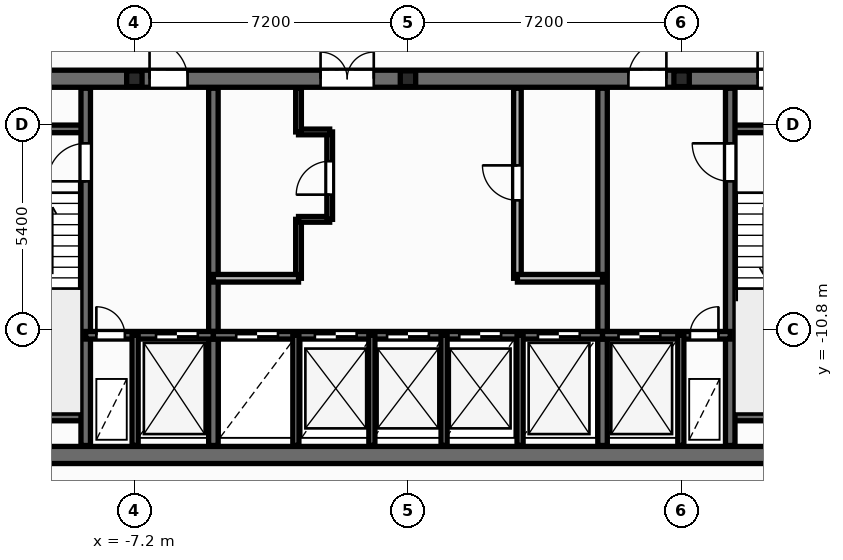
"""IFC4 building model, lengths in metres.
Left out: names, types, materials, properties, quantities, classifications, styles, units other than length and angle.
Written with IfcOpenShell. Run it as: python <this file> out.ifc"""

import sys

from ifc_helpers import new_model, si_unit, direction, frame, frame_2d, origin, origin_2d, place, context, subcontext, project, spatial, rectangle, i_section, extrude, element, fill, save


model = new_model("IFC4")
c1 = context("Model", 3, precision=1e-05, world=origin(), true_north=direction((0.0, 1.0)))
c2 = subcontext(c1, "Body", "Model", "MODEL_VIEW")
j1 = project(units=[si_unit("LENGTHUNIT", "METRE"), si_unit("PLANEANGLEUNIT", "RADIAN")], contexts=[c1])
p1 = place(None, origin())
s1 = spatial("IfcSite", under=j1, at=p1, CompositionType="ELEMENT")
p2 = place(p1, origin())
s2 = spatial("IfcBuilding", under=s1, at=p2, CompositionType="ELEMENT")
p3 = place(p2, frame((0.0, 0.0, 200.1)))
s3 = spatial("IfcBuildingStorey", under=s2, at=p3, CompositionType="ELEMENT", Elevation=200.1)
for number, where, z_axis, x_axis in (
    (1, (-7.2, -4.2, 0.0), (0.0, 0.0, 1.0), (1.0, 0.0, 0.0)),
    (2, (0.0, -4.2, 0.0), (0.0, 0.0, 1.0), (1.0, 0.0, 0.0)),
    (3, (7.2, -4.2, 0.0), (0.0, 0.0, 1.0), (1.0, 0.0, 0.0)),
):
    element("IfcColumn", number, at=place(p3, frame(where, z_axis=z_axis, x_axis=x_axis)), inside=s3, PredefinedType="PILASTER", context=c2, shape_type="SweptSolid", body=[
        extrude(i_section(OverallWidth=0.405, OverallDepth=0.414, WebThickness=0.022, FlangeThickness=0.032, at=origin_2d()), origin(), (0.0, 0.0, 1.0), 3.6),
    ])
p4 = place(p3, frame((-2.88, -9.45, 0.0), z_axis=(0.0, 0.0, 1.0), x_axis=(0.0, 1.0, 0.0)))
e4 = element("IfcWall", 4, at=p4, inside=s3, PredefinedType="PARTITIONING", context=c2, shape_type="SweptSolid", body=[
    extrude(rectangle(XDim=1.55, YDim=0.15, at=frame_2d((0.775, 0.0))), origin(), (0.0, 0.0, 1.0), 3.345),
])
p5 = place(p3, frame((-2.88, -7.9, 0.0), z_axis=(0.0, 0.0, 1.0), x_axis=(1.0, 0.0, 0.0)))
e5 = element("IfcWall", 5, at=p5, inside=s3, PredefinedType="PARTITIONING", context=c2, shape_type="SweptSolid", body=[
    extrude(rectangle(XDim=0.82, YDim=0.15, at=frame_2d((0.41, 0.0))), origin(), (0.0, 0.0, 1.0), 3.345),
])
p6 = place(p3, frame((-2.06, -7.9, 0.0), z_axis=(0.0, 0.0, 1.0), x_axis=(0.0, 1.0, 0.0)))
e6 = element("IfcWall", 6, at=p6, inside=s3, PredefinedType="PARTITIONING", context=c2, shape_type="SweptSolid", body=[
    extrude(rectangle(XDim=2.3, YDim=0.15, at=frame_2d((1.15, 0.0))), origin(), (0.0, 0.0, 1.0), 3.345),
])
p7 = place(p6, frame((0.65, 0.0, 0.0)))
e7 = element("IfcOpeningElement", 7, at=p7, cuts=e6, PredefinedType="OPENING", context=c2, shape_type="SweptSolid", body=[
    extrude(rectangle(XDim=0.886, YDim=2.104, at=frame_2d((0.44, 1.052))), frame((0.0, 0.085, 0.0), z_axis=(0.0, -1.0, 0.0), x_axis=(1.0, 0.0, 0.0)), (0.0, 0.0, 1.0), 0.17),
])
p8 = place(p3, frame((-2.88, -5.6, 0.0), z_axis=(0.0, 0.0, 1.0), x_axis=(1.0, 0.0, 0.0)))
e8 = element("IfcWall", 8, at=p8, inside=s3, PredefinedType="PARTITIONING", context=c2, shape_type="SweptSolid", body=[
    extrude(rectangle(XDim=0.82, YDim=0.15, at=frame_2d((0.41, 0.0))), origin(), (0.0, 0.0, 1.0), 3.345),
])
p9 = place(p3, frame((-2.88, -5.6, 0.0), z_axis=(0.0, 0.0, 1.0), x_axis=(0.0, 1.0, 0.0)))
e9 = element("IfcWall", 9, at=p9, inside=s3, PredefinedType="PARTITIONING", context=c2, shape_type="SweptSolid", body=[
    extrude(rectangle(XDim=1.15, YDim=0.15, at=frame_2d((0.575, 0.0))), origin(), (0.0, 0.0, 1.0), 3.345),
])
p10 = place(p3, frame((-12.65, -14.1, 0.0), z_axis=(0.0, 0.0, 1.0), x_axis=(1.0, 0.0, 0.0)))
e10 = element("IfcWall", 10, at=p10, inside=s3, PredefinedType="SHEAR", context=c2, shape_type="SweptSolid", body=[
    extrude(rectangle(XDim=25.3, YDim=0.45, at=frame_2d((12.65, 0.0))), origin(), (0.0, 0.0, 1.0), 3.6),
])
p11 = place(p3, frame((-12.65, -4.2, 0.0), z_axis=(0.0, 0.0, 1.0), x_axis=(1.0, 0.0, 0.0)))
e11 = element("IfcWall", 11, at=p11, inside=s3, PredefinedType="SHEAR", context=c2, shape_type="SweptSolid", body=[
    extrude(rectangle(XDim=25.3, YDim=0.45, at=frame_2d((12.65, 0.0))), origin(), (0.0, 0.0, 1.0), 3.6),
])
p12 = place(p11, frame((1.85, 0.0, 0.0)))
e12 = element("IfcOpeningElement", 12, at=p12, cuts=e11, PredefinedType="OPENING", context=c2, shape_type="SweptSolid", body=[
    extrude(rectangle(XDim=0.756, YDim=2.054, at=frame_2d((0.375, 1.027))), frame((0.0, 0.235, 0.0), z_axis=(0.0, -1.0, 0.0), x_axis=(1.0, 0.0, 0.0)), (0.0, 0.0, 1.0), 0.47),
])
p13 = place(p11, frame((21.85, 0.0, 0.0)))
e13 = element("IfcOpeningElement", 13, at=p13, cuts=e11, PredefinedType="OPENING", context=c2, shape_type="SweptSolid", body=[
    extrude(rectangle(XDim=0.756, YDim=2.054, at=frame_2d((0.375, 1.027))), frame((0.0, 0.235, 0.0), z_axis=(0.0, -1.0, 0.0), x_axis=(1.0, 0.0, 0.0)), (0.0, 0.0, 1.0), 0.47),
])
p14 = place(p11, frame((23.5, 0.0, 0.0)))
e14 = element("IfcOpeningElement", 14, at=p14, cuts=e11, PredefinedType="OPENING", context=c2, shape_type="SweptSolid", body=[
    extrude(rectangle(XDim=0.756, YDim=2.054, at=frame_2d((0.375, 1.027))), frame((0.0, 0.235, 0.0), z_axis=(0.0, -1.0, 0.0), x_axis=(1.0, 0.0, 0.0)), (0.0, 0.0, 1.0), 0.47),
])
p15 = place(p11, frame((5.85, 0.0, 0.0)))
e15 = element("IfcOpeningElement", 15, at=p15, cuts=e11, PredefinedType="OPENING", context=c2, shape_type="SweptSolid", body=[
    extrude(rectangle(XDim=1.006, YDim=2.104, at=frame_2d((0.5, 1.052))), frame((0.0, 0.235, 0.0), z_axis=(0.0, -1.0, 0.0), x_axis=(1.0, 0.0, 0.0)), (0.0, 0.0, 1.0), 0.47),
])
p16 = place(p11, frame((10.35, 0.0, 0.0)))
e16 = element("IfcOpeningElement", 16, at=p16, cuts=e11, PredefinedType="OPENING", context=c2, shape_type="SweptSolid", body=[
    extrude(rectangle(XDim=1.406, YDim=2.154, at=frame_2d((0.7, 1.077))), frame((0.0, 0.235, 0.0), z_axis=(0.0, -1.0, 0.0), x_axis=(1.0, 0.0, 0.0)), (0.0, 0.0, 1.0), 0.47),
])
p17 = place(p11, frame((18.45, 0.0, 0.0)))
e17 = element("IfcOpeningElement", 17, at=p17, cuts=e11, PredefinedType="OPENING", context=c2, shape_type="SweptSolid", body=[
    extrude(rectangle(XDim=1.006, YDim=2.104, at=frame_2d((0.5, 1.052))), frame((0.0, 0.235, 0.0), z_axis=(0.0, -1.0, 0.0), x_axis=(1.0, 0.0, 0.0)), (0.0, 0.0, 1.0), 0.47),
])
for number, where, z_axis, x_axis in (
    (18, (-12.35, -5.52, 0.0), (0.0, 0.0, 1.0), (1.0, 0.0, 0.0)),
    (19, (-12.35, -13.1, 0.0), (0.0, 0.0, 1.0), (1.0, 0.0, 0.0)),
    (20, (8.48, -5.52, 0.0), (0.0, 0.0, 1.0), (1.0, 0.0, 0.0)),
    (21, (8.48, -13.1, 0.0), (0.0, 0.0, 1.0), (1.0, 0.0, 0.0)),
):
    element("IfcWall", number, at=place(p3, frame(where, z_axis=z_axis, x_axis=x_axis)), inside=s3, PredefinedType="SOLIDWALL", context=c2, shape_type="SweptSolid", body=[
        extrude(rectangle(XDim=3.87, YDim=0.2, at=frame_2d((1.935, 0.0))), origin(), (0.0, 0.0, 1.0), 3.6),
    ])
p18 = place(p3, frame((-8.48, -13.85, 0.0), z_axis=(0.0, 0.0, 1.0), x_axis=(0.0, 1.0, 0.0)))
e22 = element("IfcWall", 22, at=p18, inside=s3, PredefinedType="SHEAR", context=c2, shape_type="SweptSolid", body=[
    extrude(rectangle(XDim=9.4, YDim=0.25, at=frame_2d((4.7, 0.0))), origin(), (0.0, 0.0, 1.0), 3.6),
])
p19 = place(p18, frame((6.95, 0.0, 0.0)))
e23 = element("IfcOpeningElement", 23, at=p19, cuts=e22, PredefinedType="OPENING", context=c2, shape_type="SweptSolid", body=[
    extrude(rectangle(XDim=1.006, YDim=2.104, at=frame_2d((0.5, 1.052))), frame((0.0, 0.135, 0.0), z_axis=(0.0, -1.0, 0.0), x_axis=(1.0, 0.0, 0.0)), (0.0, 0.0, 1.0), 0.27),
])
p20 = place(p3, frame((8.48, -13.85, 0.0), z_axis=(0.0, 0.0, 1.0), x_axis=(0.0, 1.0, 0.0)))
e24 = element("IfcWall", 24, at=p20, inside=s3, PredefinedType="SHEAR", context=c2, shape_type="SweptSolid", body=[
    extrude(rectangle(XDim=9.4, YDim=0.25, at=frame_2d((4.7, 0.0))), origin(), (0.0, 0.0, 1.0), 3.6),
])
p21 = place(p20, frame((6.95, 0.0, 0.0)))
e25 = element("IfcOpeningElement", 25, at=p21, cuts=e24, PredefinedType="OPENING", context=c2, shape_type="SweptSolid", body=[
    extrude(rectangle(XDim=1.006, YDim=2.104, at=frame_2d((0.5, 1.052))), frame((0.0, 0.135, 0.0), z_axis=(0.0, -1.0, 0.0), x_axis=(1.0, 0.0, 0.0)), (0.0, 0.0, 1.0), 0.27),
])
for number, where, z_axis, x_axis in (
    (26, (-5.12, -13.85, 0.0), (0.0, 0.0, 1.0), (0.0, 1.0, 0.0)),
    (27, (5.12, -13.85, 0.0), (0.0, 0.0, 1.0), (0.0, 1.0, 0.0)),
):
    element("IfcWall", number, at=place(p3, frame(where, z_axis=z_axis, x_axis=x_axis)), inside=s3, PredefinedType="SHEAR", context=c2, shape_type="SweptSolid", body=[
        extrude(rectangle(XDim=9.4, YDim=0.25, at=frame_2d((4.7, 0.0))), origin(), (0.0, 0.0, 1.0), 3.6),
    ])
p22 = place(p3, frame((-8.48, -10.95, 0.0), z_axis=(0.0, 0.0, 1.0), x_axis=(1.0, 0.0, 0.0)))
e28 = element("IfcWall", 28, at=p22, inside=s3, PredefinedType="SOLIDWALL", context=c2, shape_type="SweptSolid", body=[
    extrude(rectangle(XDim=3.36, YDim=0.2, at=frame_2d((1.68, 0.0))), origin(), (0.0, 0.0, 1.0), 3.6),
])
p23 = place(p22, frame((0.28, 0.0, 0.0)))
e29 = element("IfcOpeningElement", 29, at=p23, cuts=e28, PredefinedType="OPENING", context=c2, shape_type="SweptSolid", body=[
    extrude(rectangle(XDim=0.756, YDim=2.054, at=frame_2d((0.375, 1.027))), frame((0.0, 0.11, 0.0), z_axis=(0.0, -1.0, 0.0), x_axis=(1.0, 0.0, 0.0)), (0.0, 0.0, 1.0), 0.22),
])
p24 = place(p22, frame((1.85, 0.0, 0.0)))
e30 = element("IfcOpeningElement", 30, at=p24, cuts=e28, PredefinedType="OPENING", context=c2, shape_type="SweptSolid", body=[
    extrude(rectangle(XDim=1.106, YDim=2.104, at=frame_2d((0.55, 1.052))), frame((0.0, 0.11, 0.0), z_axis=(0.0, -1.0, 0.0), x_axis=(1.0, 0.0, 0.0)), (0.0, 0.0, 1.0), 0.22),
])
p25 = place(p3, frame((-5.12, -10.95, 0.0), z_axis=(0.0, 0.0, 1.0), x_axis=(1.0, 0.0, 0.0)))
e31 = element("IfcWall", 31, at=p25, inside=s3, PredefinedType="SOLIDWALL", context=c2, shape_type="SweptSolid", body=[
    extrude(rectangle(XDim=10.24, YDim=0.2, at=frame_2d((5.12, 0.0))), origin(), (0.0, 0.0, 1.0), 3.6),
])
p26 = place(p25, frame((0.6, 0.0, 0.0)))
e32 = element("IfcOpeningElement", 32, at=p26, cuts=e31, PredefinedType="OPENING", context=c2, shape_type="SweptSolid", body=[
    extrude(rectangle(XDim=1.106, YDim=2.104, at=frame_2d((0.55, 1.052))), frame((0.0, 0.11, 0.0), z_axis=(0.0, -1.0, 0.0), x_axis=(1.0, 0.0, 0.0)), (0.0, 0.0, 1.0), 0.22),
])
p27 = place(p25, frame((2.67, 0.0, 0.0)))
e33 = element("IfcOpeningElement", 33, at=p27, cuts=e31, PredefinedType="OPENING", context=c2, shape_type="SweptSolid", body=[
    extrude(rectangle(XDim=1.106, YDim=2.104, at=frame_2d((0.55, 1.052))), frame((0.0, 0.11, 0.0), z_axis=(0.0, -1.0, 0.0), x_axis=(1.0, 0.0, 0.0)), (0.0, 0.0, 1.0), 0.22),
])
p28 = place(p25, frame((4.57, 0.0, 0.0)))
e34 = element("IfcOpeningElement", 34, at=p28, cuts=e31, PredefinedType="OPENING", context=c2, shape_type="SweptSolid", body=[
    extrude(rectangle(XDim=1.106, YDim=2.104, at=frame_2d((0.55, 1.052))), frame((0.0, 0.11, 0.0), z_axis=(0.0, -1.0, 0.0), x_axis=(1.0, 0.0, 0.0)), (0.0, 0.0, 1.0), 0.22),
])
p29 = place(p25, frame((6.47, 0.0, 0.0)))
e35 = element("IfcOpeningElement", 35, at=p29, cuts=e31, PredefinedType="OPENING", context=c2, shape_type="SweptSolid", body=[
    extrude(rectangle(XDim=1.106, YDim=2.104, at=frame_2d((0.55, 1.052))), frame((0.0, 0.11, 0.0), z_axis=(0.0, -1.0, 0.0), x_axis=(1.0, 0.0, 0.0)), (0.0, 0.0, 1.0), 0.22),
])
p30 = place(p25, frame((8.54, 0.0, 0.0)))
e36 = element("IfcOpeningElement", 36, at=p30, cuts=e31, PredefinedType="OPENING", context=c2, shape_type="SweptSolid", body=[
    extrude(rectangle(XDim=1.106, YDim=2.104, at=frame_2d((0.55, 1.052))), frame((0.0, 0.11, 0.0), z_axis=(0.0, -1.0, 0.0), x_axis=(1.0, 0.0, 0.0)), (0.0, 0.0, 1.0), 0.22),
])
p31 = place(p3, frame((5.12, -10.95, 0.0), z_axis=(0.0, 0.0, 1.0), x_axis=(1.0, 0.0, 0.0)))
e37 = element("IfcWall", 37, at=p31, inside=s3, PredefinedType="SOLIDWALL", context=c2, shape_type="SweptSolid", body=[
    extrude(rectangle(XDim=3.36, YDim=0.2, at=frame_2d((1.68, 0.0))), origin(), (0.0, 0.0, 1.0), 3.6),
])
p32 = place(p31, frame((0.42, 0.0, 0.0)))
e38 = element("IfcOpeningElement", 38, at=p32, cuts=e37, PredefinedType="OPENING", context=c2, shape_type="SweptSolid", body=[
    extrude(rectangle(XDim=1.106, YDim=2.104, at=frame_2d((0.55, 1.052))), frame((0.0, 0.11, 0.0), z_axis=(0.0, -1.0, 0.0), x_axis=(1.0, 0.0, 0.0)), (0.0, 0.0, 1.0), 0.22),
])
p33 = place(p31, frame((2.3, 0.0, 0.0)))
e39 = element("IfcOpeningElement", 39, at=p33, cuts=e37, PredefinedType="OPENING", context=c2, shape_type="SweptSolid", body=[
    extrude(rectangle(XDim=0.756, YDim=2.054, at=frame_2d((0.375, 1.027))), frame((0.0, 0.11, 0.0), z_axis=(0.0, -1.0, 0.0), x_axis=(1.0, 0.0, 0.0)), (0.0, 0.0, 1.0), 0.22),
])
for number, where, z_axis, x_axis in (
    (40, (-7.18, -13.85, 0.0), (0.0, 0.0, 1.0), (0.0, 1.0, 0.0)),
    (41, (7.18, -13.85, 0.0), (0.0, 0.0, 1.0), (0.0, 1.0, 0.0)),
    (42, (-2.95, -13.85, 0.0), (0.0, 0.0, 1.0), (0.0, 1.0, 0.0)),
    (43, (2.95, -13.85, 0.0), (0.0, 0.0, 1.0), (0.0, 1.0, 0.0)),
):
    element("IfcWall", number, at=place(p3, frame(where, z_axis=z_axis, x_axis=x_axis)), inside=s3, PredefinedType="PARTITIONING", context=c2, shape_type="SweptSolid", body=[
        extrude(rectangle(XDim=2.9, YDim=0.16, at=frame_2d((1.45, 0.0))), origin(), (0.0, 0.0, 1.0), 2.47),
    ])
p34 = place(p3, frame((-5.12, -9.45, 0.0), z_axis=(0.0, 0.0, 1.0), x_axis=(1.0, 0.0, 0.0)))
e44 = element("IfcWall", 44, at=p34, inside=s3, PredefinedType="SOLIDWALL", context=c2, shape_type="SweptSolid", body=[
    extrude(rectangle(XDim=2.24, YDim=0.2, at=frame_2d((1.12, 0.0))), origin(), (0.0, 0.0, 1.0), 3.345),
])
p35 = place(p3, frame((2.88, -9.45, 0.0), z_axis=(0.0, 0.0, 1.0), x_axis=(0.0, 1.0, 0.0)))
e45 = element("IfcWall", 45, at=p35, inside=s3, PredefinedType="SOLIDWALL", context=c2, shape_type="SweptSolid", body=[
    extrude(rectangle(XDim=5.0, YDim=0.2, at=frame_2d((2.5, 0.0))), origin(), (0.0, 0.0, 1.0), 3.345),
])
p36 = place(p35, frame((2.05, 0.0, 0.0)))
e46 = element("IfcOpeningElement", 46, at=p36, cuts=e45, PredefinedType="OPENING", context=c2, shape_type="SweptSolid", body=[
    extrude(rectangle(XDim=0.926, YDim=2.104, at=frame_2d((0.46, 1.052))), frame((0.0, 0.11, 0.0), z_axis=(0.0, -1.0, 0.0), x_axis=(1.0, 0.0, 0.0)), (0.0, 0.0, 1.0), 0.22),
])
p37 = place(p3, frame((2.88, -9.45, 0.0), z_axis=(0.0, 0.0, 1.0), x_axis=(1.0, 0.0, 0.0)))
e47 = element("IfcWall", 47, at=p37, inside=s3, PredefinedType="SOLIDWALL", context=c2, shape_type="SweptSolid", body=[
    extrude(rectangle(XDim=2.24, YDim=0.2, at=frame_2d((1.12, 0.0))), origin(), (0.0, 0.0, 1.0), 3.345),
])
for number, where, z_axis, x_axis in (
    (48, (-0.95, -13.85, 0.0), (0.0, 0.0, 1.0), (0.0, 1.0, 0.0)),
    (49, (0.95, -13.85, 0.0), (0.0, 0.0, 1.0), (0.0, 1.0, 0.0)),
):
    element("IfcWall", number, at=place(p3, frame(where, z_axis=z_axis, x_axis=x_axis)), inside=s3, PredefinedType="PARTITIONING", context=c2, shape_type="SweptSolid", body=[
        extrude(rectangle(XDim=2.9, YDim=0.16, at=frame_2d((1.45, 0.0))), origin(), (0.0, 0.0, 1.0), 2.47),
    ])
p38 = place(p7, origin())
e50 = element("IfcDoor", 50, at=p38, inside=s3, OperationType="SINGLE_SWING_LEFT", PredefinedType="DOOR", context=c2, shape_type="SweptSolid", body=[
    extrude(rectangle(XDim=0.88, YDim=2.1, at=frame_2d((0.44, 1.05))), frame((0.0, 0.025, 0.0), z_axis=(0.0, -1.0, 0.0), x_axis=(1.0, 0.0, 0.0)), (0.0, 0.0, 1.0), 0.05),
])
fill(e7, e50)
p39 = place(p36, origin())
e51 = element("IfcDoor", 51, at=p39, inside=s3, OperationType="SINGLE_SWING_RIGHT", PredefinedType="DOOR", context=c2, shape_type="SweptSolid", body=[
    extrude(rectangle(XDim=0.92, YDim=2.1, at=frame_2d((0.46, 1.05))), frame((0.0, 0.025, 0.0), z_axis=(0.0, -1.0, 0.0), x_axis=(1.0, 0.0, 0.0)), (0.0, 0.0, 1.0), 0.05),
])
fill(e46, e51)
p40 = place(p19, origin())
e52 = element("IfcDoor", 52, at=p40, inside=s3, OperationType="SINGLE_SWING_LEFT", PredefinedType="DOOR", context=c2, shape_type="SweptSolid", body=[
    extrude(rectangle(XDim=1.0, YDim=2.1, at=frame_2d((0.5, 1.05))), frame((0.0, 0.025, 0.0), z_axis=(0.0, -1.0, 0.0), x_axis=(1.0, 0.0, 0.0)), (0.0, 0.0, 1.0), 0.05),
])
fill(e23, e52)
p41 = place(p21, origin())
e53 = element("IfcDoor", 53, at=p41, inside=s3, OperationType="SINGLE_SWING_RIGHT", PredefinedType="DOOR", context=c2, shape_type="SweptSolid", body=[
    extrude(rectangle(XDim=1.0, YDim=2.1, at=frame_2d((0.5, 1.05))), frame((0.0, 0.025, 0.0), z_axis=(0.0, -1.0, 0.0), x_axis=(1.0, 0.0, 0.0)), (0.0, 0.0, 1.0), 0.05),
])
fill(e25, e53)
p42 = place(p23, origin())
e54 = element("IfcDoor", 54, at=p42, inside=s3, OperationType="SINGLE_SWING_LEFT", PredefinedType="DOOR", context=c2, shape_type="SweptSolid", body=[
    extrude(rectangle(XDim=0.75, YDim=2.05, at=frame_2d((0.375, 1.025))), frame((0.0, 0.025, 0.0), z_axis=(0.0, -1.0, 0.0), x_axis=(1.0, 0.0, 0.0)), (0.0, 0.0, 1.0), 0.05),
])
fill(e29, e54)
p43 = place(p24, origin())
e55 = element("IfcDoor", 55, at=p43, inside=s3, OperationType="DOUBLE_DOOR_SLIDING", PredefinedType="DOOR", context=c2, shape_type="SweptSolid", body=[
    extrude(rectangle(XDim=1.1, YDim=2.1, at=frame_2d((0.55, 1.05))), frame((0.0, 0.025, 0.0), z_axis=(0.0, -1.0, 0.0), x_axis=(1.0, 0.0, 0.0)), (0.0, 0.0, 1.0), 0.05),
])
fill(e30, e55)
p44 = place(p32, origin())
e56 = element("IfcDoor", 56, at=p44, inside=s3, OperationType="DOUBLE_DOOR_SLIDING", PredefinedType="DOOR", context=c2, shape_type="SweptSolid", body=[
    extrude(rectangle(XDim=1.1, YDim=2.1, at=frame_2d((0.55, 1.05))), frame((0.0, 0.025, 0.0), z_axis=(0.0, -1.0, 0.0), x_axis=(1.0, 0.0, 0.0)), (0.0, 0.0, 1.0), 0.05),
])
fill(e38, e56)
p45 = place(p33, origin())
e57 = element("IfcDoor", 57, at=p45, inside=s3, OperationType="SINGLE_SWING_RIGHT", PredefinedType="DOOR", context=c2, shape_type="SweptSolid", body=[
    extrude(rectangle(XDim=0.75, YDim=2.05, at=frame_2d((0.375, 1.025))), frame((0.0, 0.025, 0.0), z_axis=(0.0, -1.0, 0.0), x_axis=(1.0, 0.0, 0.0)), (0.0, 0.0, 1.0), 0.05),
])
fill(e39, e57)
p46 = place(p26, origin())
e58 = element("IfcDoor", 58, at=p46, inside=s3, OperationType="DOUBLE_DOOR_SLIDING", PredefinedType="DOOR", context=c2, shape_type="SweptSolid", body=[
    extrude(rectangle(XDim=1.1, YDim=2.1, at=frame_2d((0.55, 1.05))), frame((0.0, 0.025, 0.0), z_axis=(0.0, -1.0, 0.0), x_axis=(1.0, 0.0, 0.0)), (0.0, 0.0, 1.0), 0.05),
])
fill(e32, e58)
p47 = place(p27, origin())
e59 = element("IfcDoor", 59, at=p47, inside=s3, OperationType="DOUBLE_DOOR_SLIDING", PredefinedType="DOOR", context=c2, shape_type="SweptSolid", body=[
    extrude(rectangle(XDim=1.1, YDim=2.1, at=frame_2d((0.55, 1.05))), frame((0.0, 0.025, 0.0), z_axis=(0.0, -1.0, 0.0), x_axis=(1.0, 0.0, 0.0)), (0.0, 0.0, 1.0), 0.05),
])
fill(e33, e59)
p48 = place(p28, origin())
e60 = element("IfcDoor", 60, at=p48, inside=s3, OperationType="DOUBLE_DOOR_SLIDING", PredefinedType="DOOR", context=c2, shape_type="SweptSolid", body=[
    extrude(rectangle(XDim=1.1, YDim=2.1, at=frame_2d((0.55, 1.05))), frame((0.0, 0.025, 0.0), z_axis=(0.0, -1.0, 0.0), x_axis=(1.0, 0.0, 0.0)), (0.0, 0.0, 1.0), 0.05),
])
fill(e34, e60)
p49 = place(p29, origin())
e61 = element("IfcDoor", 61, at=p49, inside=s3, OperationType="DOUBLE_DOOR_SLIDING", PredefinedType="DOOR", context=c2, shape_type="SweptSolid", body=[
    extrude(rectangle(XDim=1.1, YDim=2.1, at=frame_2d((0.55, 1.05))), frame((0.0, 0.025, 0.0), z_axis=(0.0, -1.0, 0.0), x_axis=(1.0, 0.0, 0.0)), (0.0, 0.0, 1.0), 0.05),
])
fill(e35, e61)
p50 = place(p30, origin())
e62 = element("IfcDoor", 62, at=p50, inside=s3, OperationType="DOUBLE_DOOR_SLIDING", PredefinedType="DOOR", context=c2, shape_type="SweptSolid", body=[
    extrude(rectangle(XDim=1.1, YDim=2.1, at=frame_2d((0.55, 1.05))), frame((0.0, 0.025, 0.0), z_axis=(0.0, -1.0, 0.0), x_axis=(1.0, 0.0, 0.0)), (0.0, 0.0, 1.0), 0.05),
])
fill(e36, e62)
p51 = place(p13, origin())
e63 = element("IfcDoor", 63, at=p51, inside=s3, OperationType="SINGLE_SWING_LEFT", PredefinedType="DOOR", context=c2, shape_type="SweptSolid", body=[
    extrude(rectangle(XDim=0.75, YDim=2.05, at=frame_2d((0.375, 1.025))), frame((0.0, 0.025, 0.0), z_axis=(0.0, -1.0, 0.0), x_axis=(1.0, 0.0, 0.0)), (0.0, 0.0, 1.0), 0.05),
])
fill(e13, e63)
p52 = place(p15, origin())
e64 = element("IfcDoor", 64, at=p52, inside=s3, OperationType="SINGLE_SWING_LEFT", PredefinedType="DOOR", context=c2, shape_type="SweptSolid", body=[
    extrude(rectangle(XDim=1.0, YDim=2.1, at=frame_2d((0.5, 1.05))), frame((0.0, 0.025, 0.0), z_axis=(0.0, -1.0, 0.0), x_axis=(1.0, 0.0, 0.0)), (0.0, 0.0, 1.0), 0.05),
])
fill(e15, e64)
p53 = place(p16, origin())
e65 = element("IfcDoor", 65, at=p53, inside=s3, OperationType="DOUBLE_DOOR_SINGLE_SWING", PredefinedType="DOOR", context=c2, shape_type="SweptSolid", body=[
    extrude(rectangle(XDim=1.4, YDim=2.15, at=frame_2d((0.7, 1.075))), frame((0.0, 0.025, 0.0), z_axis=(0.0, -1.0, 0.0), x_axis=(1.0, 0.0, 0.0)), (0.0, 0.0, 1.0), 0.05),
])
fill(e16, e65)
p54 = place(p17, origin())
e66 = element("IfcDoor", 66, at=p54, inside=s3, OperationType="SINGLE_SWING_RIGHT", PredefinedType="DOOR", context=c2, shape_type="SweptSolid", body=[
    extrude(rectangle(XDim=1.0, YDim=2.1, at=frame_2d((0.5, 1.05))), frame((0.0, 0.025, 0.0), z_axis=(0.0, -1.0, 0.0), x_axis=(1.0, 0.0, 0.0)), (0.0, 0.0, 1.0), 0.05),
])
fill(e17, e66)
save(model, sys.argv[1])
